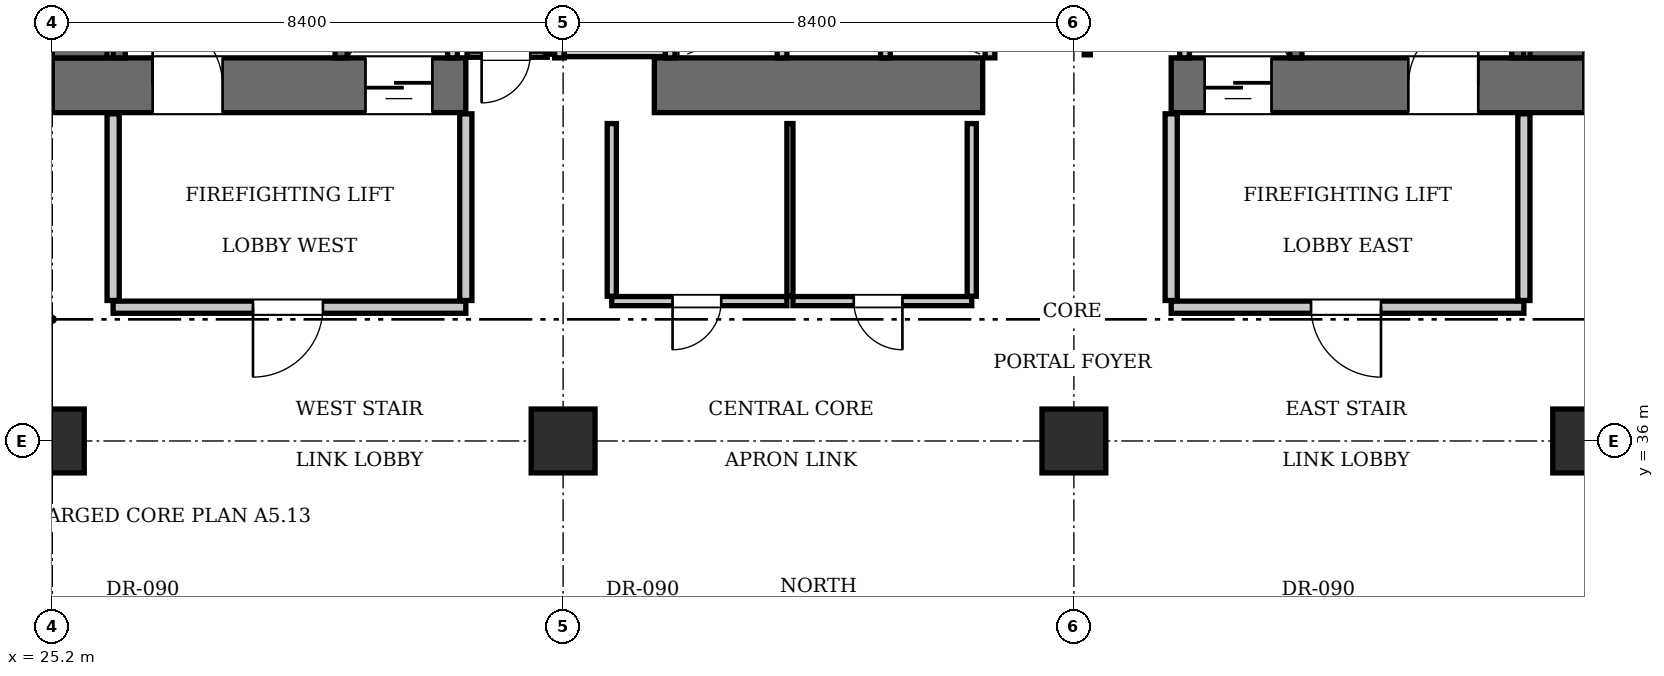
"""IFC4 building model, lengths in metres.
Left out: names, types, materials, properties, quantities, classifications, styles, units other than length and angle.
Written with IfcOpenShell. Run it as: python <this file> out.ifc"""

import sys

from ifc_helpers import new_model, si_unit, direction, frame, frame_2d, origin, origin_2d, place, context, subcontext, project, spatial, rectangle, extrude, element, fill, save


model = new_model("IFC4")
c1 = context("Model", 3, precision=1e-05, world=origin(), true_north=direction((0.0, 1.0)))
c2 = subcontext(c1, "Body", "Model", "MODEL_VIEW")
j1 = project(units=[si_unit("LENGTHUNIT", "METRE"), si_unit("PLANEANGLEUNIT", "RADIAN")], contexts=[c1])
p1 = place(None, origin())
s1 = spatial("IfcSite", under=j1, at=p1, CompositionType="ELEMENT")
p2 = place(p1, origin())
s2 = spatial("IfcBuilding", under=s1, at=p2, CompositionType="ELEMENT")
p3 = place(p2, frame((0.0, 0.0, 50.05)))
s3 = spatial("IfcBuildingStorey", under=s2, at=p3, CompositionType="ELEMENT", Elevation=50.05)
p4 = place(p3, frame((25.2, 41.85, 0.0), z_axis=(0.0, 0.0, 1.0), x_axis=(1.0, 0.0, 0.0)))
e1 = element("IfcWall", 1, at=p4, inside=s3, PredefinedType="SHEAR", context=c2, shape_type="SweptSolid", body=[
    extrude(rectangle(XDim=6.8, YDim=0.9, at=frame_2d((3.4, 0.0))), origin(), (0.0, 0.0, 1.0), 3.85),
])
p5 = place(p4, frame((1.65, 0.0, 0.0)))
e2 = element("IfcOpeningElement", 2, at=p5, cuts=e1, PredefinedType="OPENING", context=c2, shape_type="SweptSolid", body=[
    extrude(rectangle(XDim=1.15, YDim=2.15, at=frame_2d((0.575, 1.075))), frame((0.0, 0.46, 0.0), z_axis=(0.0, -1.0, 0.0), x_axis=(1.0, 0.0, 0.0)), (0.0, 0.0, 1.0), 0.92),
])
p6 = place(p4, frame((5.15, 0.0, 0.0)))
e3 = element("IfcOpeningElement", 3, at=p6, cuts=e1, PredefinedType="OPENING", context=c2, shape_type="SweptSolid", body=[
    extrude(rectangle(XDim=1.1, YDim=2.2, at=frame_2d((0.55, 1.1))), frame((0.0, 0.46, 0.0), z_axis=(0.0, -1.0, 0.0), x_axis=(1.0, 0.0, 0.0)), (0.0, 0.0, 1.0), 0.92),
])
p7 = place(p3, frame((35.1, 41.85, 0.0), z_axis=(0.0, 0.0, 1.0), x_axis=(1.0, 0.0, 0.0)))
e4 = element("IfcWall", 4, at=p7, inside=s3, PredefinedType="SHEAR", context=c2, shape_type="SweptSolid", body=[
    extrude(rectangle(XDim=5.4, YDim=0.9, at=frame_2d((2.7, 0.0))), origin(), (0.0, 0.0, 1.0), 3.85),
])
p8 = place(p3, frame((43.6, 41.85, 0.0), z_axis=(0.0, 0.0, 1.0), x_axis=(1.0, 0.0, 0.0)))
e5 = element("IfcWall", 5, at=p8, inside=s3, PredefinedType="SHEAR", context=c2, shape_type="SweptSolid", body=[
    extrude(rectangle(XDim=6.8, YDim=0.9, at=frame_2d((3.4, 0.0))), origin(), (0.0, 0.0, 1.0), 3.85),
])
p9 = place(p8, frame((3.9, 0.0, 0.0)))
e6 = element("IfcOpeningElement", 6, at=p9, cuts=e5, PredefinedType="OPENING", context=c2, shape_type="SweptSolid", body=[
    extrude(rectangle(XDim=1.15, YDim=2.15, at=frame_2d((0.575, 1.075))), frame((0.0, 0.46, 0.0), z_axis=(0.0, -1.0, 0.0), x_axis=(1.0, 0.0, 0.0)), (0.0, 0.0, 1.0), 0.92),
])
p10 = place(p8, frame((0.55, 0.0, 0.0)))
e7 = element("IfcOpeningElement", 7, at=p10, cuts=e5, PredefinedType="OPENING", context=c2, shape_type="SweptSolid", body=[
    extrude(rectangle(XDim=1.1, YDim=2.2, at=frame_2d((0.55, 1.1))), frame((0.0, 0.46, 0.0), z_axis=(0.0, -1.0, 0.0), x_axis=(1.0, 0.0, 0.0)), (0.0, 0.0, 1.0), 0.92),
])
for number, where, z_axis, x_axis in (
    (8, (25.65, 42.3, 0.0), (0.0, 0.0, 1.0), (0.0, 1.0, 0.0)),
    (9, (49.95, 42.3, 0.0), (0.0, 0.0, 1.0), (0.0, 1.0, 0.0)),
):
    element("IfcWall", number, at=place(p3, frame(where, z_axis=z_axis, x_axis=x_axis)), inside=s3, PredefinedType="SHEAR", context=c2, shape_type="SweptSolid", body=[
        extrude(rectangle(XDim=1.6, YDim=0.9, at=frame_2d((0.8, 0.0))), origin(), (0.0, 0.0, 1.0), 3.85),
    ])
for number, where, z_axis, x_axis in (
    (10, (25.2, 36.0, 0.0), (0.0, 0.0, 1.0), (1.0, 0.0, 0.0)),
    (11, (33.6, 36.0, 0.0), (0.0, 0.0, 1.0), (1.0, 0.0, 0.0)),
    (12, (42.0, 36.0, 0.0), (0.0, 0.0, 1.0), (1.0, 0.0, 0.0)),
    (13, (50.4, 36.0, 0.0), (0.0, 0.0, 1.0), (1.0, 0.0, 0.0)),
):
    element("IfcColumn", number, at=place(p3, frame(where, z_axis=z_axis, x_axis=x_axis)), inside=s3, PredefinedType="COLUMN", context=c2, shape_type="SweptSolid", body=[
        extrude(rectangle(XDim=1.05, YDim=1.05, at=origin_2d()), origin(), (0.0, 0.0, 1.0), 3.85),
    ])
p11 = place(p3, frame((29.95, 42.3, 0.0), z_axis=(0.0, 0.0, 1.0), x_axis=(0.0, 1.0, 0.0)))
e14 = element("IfcWall", 14, at=p11, inside=s3, PredefinedType="SOLIDWALL", context=c2, shape_type="SweptSolid", body=[
    extrude(rectangle(XDim=8.85, YDim=0.2, at=frame_2d((4.425, 0.0))), origin(), (0.0, 0.0, 1.0), 3.61),
])
p12 = place(p3, frame((26.3, 42.3, 0.0), z_axis=(0.0, 0.0, 1.0), x_axis=(0.0, 1.0, 0.0)))
e15 = element("IfcWall", 15, at=p12, inside=s3, PredefinedType="SOLIDWALL", context=c2, shape_type="SweptSolid", body=[
    extrude(rectangle(XDim=1.58, YDim=0.2, at=frame_2d((0.79, 0.0))), origin(), (0.0, 0.0, 1.0), 3.61),
])
p13 = place(p3, frame((45.65, 42.3, 0.0), z_axis=(0.0, 0.0, 1.0), x_axis=(0.0, 1.0, 0.0)))
e16 = element("IfcWall", 16, at=p13, inside=s3, PredefinedType="SOLIDWALL", context=c2, shape_type="SweptSolid", body=[
    extrude(rectangle(XDim=8.85, YDim=0.2, at=frame_2d((4.425, 0.0))), origin(), (0.0, 0.0, 1.0), 3.61),
])
p14 = place(p3, frame((49.3, 42.3, 0.0), z_axis=(0.0, 0.0, 1.0), x_axis=(0.0, 1.0, 0.0)))
e17 = element("IfcWall", 17, at=p14, inside=s3, PredefinedType="SOLIDWALL", context=c2, shape_type="SweptSolid", body=[
    extrude(rectangle(XDim=1.58, YDim=0.2, at=frame_2d((0.79, 0.0))), origin(), (0.0, 0.0, 1.0), 3.61),
])
for number, where, z_axis, x_axis in (
    (18, (31.78, 42.3, 0.0), (0.0, 0.0, 1.0), (0.0, 1.0, 0.0)),
    (19, (43.82, 42.3, 0.0), (0.0, 0.0, 1.0), (0.0, 1.0, 0.0)),
):
    element("IfcWall", number, at=place(p3, frame(where, z_axis=z_axis, x_axis=x_axis)), inside=s3, PredefinedType="SOLIDWALL", context=c2, shape_type="SweptSolid", body=[
        extrude(rectangle(XDim=2.44, YDim=0.16, at=frame_2d((1.22, 0.0))), origin(), (0.0, 0.0, 1.0), 3.61),
    ])
for number, where, z_axis, x_axis in (
    (20, (37.2, 42.3, 0.0), (0.0, 0.0, 1.0), (0.0, 1.0, 0.0)),
    (21, (38.9, 42.3, 0.0), (0.0, 0.0, 1.0), (0.0, 1.0, 0.0)),
    (22, (40.62, 42.3, 0.0), (0.0, 0.0, 1.0), (0.0, 1.0, 0.0)),
):
    element("IfcWall", number, at=place(p3, frame(where, z_axis=z_axis, x_axis=x_axis)), inside=s3, PredefinedType="SOLIDWALL", context=c2, shape_type="SweptSolid", body=[
        extrude(rectangle(XDim=2.05, YDim=0.16, at=frame_2d((1.025, 0.0))), origin(), (0.0, 0.0, 1.0), 3.61),
    ])
for number, where, z_axis, x_axis in (
    (23, (33.54, 42.3, 0.0), (0.0, 0.0, 1.0), (0.0, 1.0, 0.0)),
    (24, (35.36, 42.3, 0.0), (0.0, 0.0, 1.0), (0.0, 1.0, 0.0)),
):
    element("IfcWall", number, at=place(p3, frame(where, z_axis=z_axis, x_axis=x_axis)), inside=s3, PredefinedType="SOLIDWALL", context=c2, shape_type="SweptSolid", body=[
        extrude(rectangle(XDim=2.1, YDim=0.16, at=frame_2d((1.05, 0.0))), origin(), (0.0, 0.0, 1.0), 3.61),
    ])
p15 = place(p3, frame((33.62, 42.4, 0.0), z_axis=(0.0, 0.0, 1.0), x_axis=(1.0, 0.0, 0.0)))
e25 = element("IfcWall", 25, at=p15, inside=s3, PredefinedType="SOLIDWALL", context=c2, shape_type="SweptSolid", body=[
    extrude(rectangle(XDim=1.66, YDim=0.16, at=frame_2d((0.83, 0.0))), origin(), (0.0, 0.0, 1.0), 3.61),
])
p16 = place(p3, frame((26.2, 38.2, 0.0), z_axis=(0.0, 0.0, 1.0), x_axis=(1.0, 0.0, 0.0)))
e26 = element("IfcWall", 26, at=p16, inside=s3, PredefinedType="PARTITIONING", context=c2, shape_type="SweptSolid", body=[
    extrude(rectangle(XDim=5.8, YDim=0.2, at=frame_2d((2.9, 0.0))), origin(), (0.0, 0.0, 1.0), 3.61),
])
p17 = place(p16, frame((2.3, 0.0, 0.0)))
e27 = element("IfcOpeningElement", 27, at=p17, cuts=e26, PredefinedType="OPENING", context=c2, shape_type="SweptSolid", body=[
    extrude(rectangle(XDim=1.15, YDim=2.15, at=frame_2d((0.575, 1.075))), frame((0.0, 0.11, 0.0), z_axis=(0.0, -1.0, 0.0), x_axis=(1.0, 0.0, 0.0)), (0.0, 0.0, 1.0), 0.22),
])
for number, where, z_axis, x_axis in (
    (28, (26.2, 38.31, 0.0), (0.0, 0.0, 1.0), (0.0, 1.0, 0.0)),
    (29, (32.0, 38.31, 0.0), (0.0, 0.0, 1.0), (0.0, 1.0, 0.0)),
):
    element("IfcWall", number, at=place(p3, frame(where, z_axis=z_axis, x_axis=x_axis)), inside=s3, PredefinedType="PARTITIONING", context=c2, shape_type="SweptSolid", body=[
        extrude(rectangle(XDim=3.07, YDim=0.2, at=frame_2d((1.535, 0.0))), origin(), (0.0, 0.0, 1.0), 3.61),
    ])
p18 = place(p3, frame((43.6, 38.2, 0.0), z_axis=(0.0, 0.0, 1.0), x_axis=(1.0, 0.0, 0.0)))
e30 = element("IfcWall", 30, at=p18, inside=s3, PredefinedType="PARTITIONING", context=c2, shape_type="SweptSolid", body=[
    extrude(rectangle(XDim=5.8, YDim=0.2, at=frame_2d((2.9, 0.0))), origin(), (0.0, 0.0, 1.0), 3.61),
])
p19 = place(p18, frame((2.3, 0.0, 0.0)))
e31 = element("IfcOpeningElement", 31, at=p19, cuts=e30, PredefinedType="OPENING", context=c2, shape_type="SweptSolid", body=[
    extrude(rectangle(XDim=1.15, YDim=2.15, at=frame_2d((0.575, 1.075))), frame((0.0, 0.11, 0.0), z_axis=(0.0, -1.0, 0.0), x_axis=(1.0, 0.0, 0.0)), (0.0, 0.0, 1.0), 0.22),
])
for number, where, z_axis, x_axis in (
    (32, (43.6, 38.31, 0.0), (0.0, 0.0, 1.0), (0.0, 1.0, 0.0)),
    (33, (49.4, 38.31, 0.0), (0.0, 0.0, 1.0), (0.0, 1.0, 0.0)),
):
    element("IfcWall", number, at=place(p3, frame(where, z_axis=z_axis, x_axis=x_axis)), inside=s3, PredefinedType="PARTITIONING", context=c2, shape_type="SweptSolid", body=[
        extrude(rectangle(XDim=3.07, YDim=0.2, at=frame_2d((1.535, 0.0))), origin(), (0.0, 0.0, 1.0), 3.61),
    ])
p20 = place(p3, frame((32.02, 42.36, 0.0), z_axis=(0.0, 0.0, 1.0), x_axis=(1.0, 0.0, 0.0)))
e34 = element("IfcWall", 34, at=p20, inside=s3, PredefinedType="PARTITIONING", context=c2, shape_type="SweptSolid", body=[
    extrude(rectangle(XDim=1.32, YDim=0.1, at=frame_2d((0.66, 0.0))), origin(), (0.0, 0.0, 1.0), 3.61),
])
p21 = place(p20, frame((0.24, 0.0, 0.0)))
e35 = element("IfcOpeningElement", 35, at=p21, cuts=e34, PredefinedType="OPENING", context=c2, shape_type="SweptSolid", body=[
    extrude(rectangle(XDim=0.8, YDim=2.05, at=frame_2d((0.4, 1.025))), frame((0.0, 0.06, 0.0), z_axis=(0.0, -1.0, 0.0), x_axis=(1.0, 0.0, 0.0)), (0.0, 0.0, 1.0), 0.12),
])
p22 = place(p3, frame((33.36, 42.36, 0.0), z_axis=(0.0, 0.0, 1.0), x_axis=(0.0, 1.0, 0.0)))
e36 = element("IfcWall", 36, at=p22, inside=s3, PredefinedType="PARTITIONING", context=c2, shape_type="SweptSolid", body=[
    extrude(rectangle(XDim=2.58, YDim=0.1, at=frame_2d((1.29, 0.0))), origin(), (0.0, 0.0, 1.0), 3.61),
])
p23 = place(p3, frame((42.22, 42.35, 0.0), z_axis=(0.0, 0.0, 1.0), x_axis=(0.0, 1.0, 0.0)))
e37 = element("IfcWall", 37, at=p23, inside=s3, PredefinedType="PARTITIONING", context=c2, shape_type="SweptSolid", body=[
    extrude(rectangle(XDim=2.61, YDim=0.1, at=frame_2d((1.305, 0.0))), origin(), (0.0, 0.0, 1.0), 3.61),
])
p24 = place(p23, frame((0.65, 0.0, 0.0)))
e38 = element("IfcOpeningElement", 38, at=p24, cuts=e37, PredefinedType="OPENING", context=c2, shape_type="SweptSolid", body=[
    extrude(rectangle(XDim=0.8, YDim=2.05, at=frame_2d((0.4, 1.025))), frame((0.0, 0.06, 0.0), z_axis=(0.0, -1.0, 0.0), x_axis=(1.0, 0.0, 0.0)), (0.0, 0.0, 1.0), 0.12),
])
p25 = place(p3, frame((34.4, 38.3, 0.0), z_axis=(0.0, 0.0, 1.0), x_axis=(1.0, 0.0, 0.0)))
e39 = element("IfcWall", 39, at=p25, inside=s3, PredefinedType="PARTITIONING", context=c2, shape_type="SweptSolid", body=[
    extrude(rectangle(XDim=2.88, YDim=0.15, at=frame_2d((1.44, 0.0))), origin(), (0.0, 0.0, 1.0), 3.61),
])
p26 = place(p25, frame((1.0, 0.0, 0.0)))
e40 = element("IfcOpeningElement", 40, at=p26, cuts=e39, PredefinedType="OPENING", context=c2, shape_type="SweptSolid", body=[
    extrude(rectangle(XDim=0.8, YDim=2.05, at=frame_2d((0.4, 1.025))), frame((0.0, 0.085, 0.0), z_axis=(0.0, -1.0, 0.0), x_axis=(1.0, 0.0, 0.0)), (0.0, 0.0, 1.0), 0.17),
])
p27 = place(p3, frame((37.38, 38.3, 0.0), z_axis=(0.0, 0.0, 1.0), x_axis=(1.0, 0.0, 0.0)))
e41 = element("IfcWall", 41, at=p27, inside=s3, PredefinedType="PARTITIONING", context=c2, shape_type="SweptSolid", body=[
    extrude(rectangle(XDim=2.94, YDim=0.15, at=frame_2d((1.47, 0.0))), origin(), (0.0, 0.0, 1.0), 3.61),
])
p28 = place(p27, frame((1.0, 0.0, 0.0)))
e42 = element("IfcOpeningElement", 42, at=p28, cuts=e41, PredefinedType="OPENING", context=c2, shape_type="SweptSolid", body=[
    extrude(rectangle(XDim=0.8, YDim=2.05, at=frame_2d((0.4, 1.025))), frame((0.0, 0.085, 0.0), z_axis=(0.0, -1.0, 0.0), x_axis=(1.0, 0.0, 0.0)), (0.0, 0.0, 1.0), 0.17),
])
p29 = place(p3, frame((34.4, 38.38, 0.0), z_axis=(0.0, 0.0, 1.0), x_axis=(0.0, 1.0, 0.0)))
e43 = element("IfcWall", 43, at=p29, inside=s3, PredefinedType="PARTITIONING", context=c2, shape_type="SweptSolid", body=[
    extrude(rectangle(XDim=2.84, YDim=0.15, at=frame_2d((1.42, 0.0))), origin(), (0.0, 0.0, 1.0), 3.61),
])
p30 = place(p3, frame((37.33, 38.38, 0.0), z_axis=(0.0, 0.0, 1.0), x_axis=(0.0, 1.0, 0.0)))
e44 = element("IfcWall", 44, at=p30, inside=s3, PredefinedType="PARTITIONING", context=c2, shape_type="SweptSolid", body=[
    extrude(rectangle(XDim=2.84, YDim=0.1, at=frame_2d((1.42, 0.0))), origin(), (0.0, 0.0, 1.0), 3.61),
])
p31 = place(p3, frame((40.32, 38.38, 0.0), z_axis=(0.0, 0.0, 1.0), x_axis=(0.0, 1.0, 0.0)))
e45 = element("IfcWall", 45, at=p31, inside=s3, PredefinedType="PARTITIONING", context=c2, shape_type="SweptSolid", body=[
    extrude(rectangle(XDim=2.84, YDim=0.15, at=frame_2d((1.42, 0.0))), origin(), (0.0, 0.0, 1.0), 3.61),
])
p32 = place(p5, origin())
e46 = element("IfcDoor", 46, at=p32, inside=s3, OperationType="SINGLE_SWING_LEFT", PredefinedType="DOOR", context=c2, shape_type="SweptSolid", body=[
    extrude(rectangle(XDim=1.15, YDim=2.15, at=frame_2d((0.575, 1.075))), frame((0.0, 0.025, 0.0), z_axis=(0.0, -1.0, 0.0), x_axis=(1.0, 0.0, 0.0)), (0.0, 0.0, 1.0), 0.05),
])
fill(e2, e46)
p33 = place(p9, origin())
e47 = element("IfcDoor", 47, at=p33, inside=s3, OperationType="SINGLE_SWING_RIGHT", PredefinedType="DOOR", context=c2, shape_type="SweptSolid", body=[
    extrude(rectangle(XDim=1.15, YDim=2.15, at=frame_2d((0.575, 1.075))), frame((0.0, 0.025, 0.0), z_axis=(0.0, -1.0, 0.0), x_axis=(1.0, 0.0, 0.0)), (0.0, 0.0, 1.0), 0.05),
])
fill(e6, e47)
p34 = place(p6, frame((1.1, 0.0, 0.0), z_axis=(0.0, 0.0, 1.0), x_axis=(-1.0, 0.0, 0.0)))
e48 = element("IfcDoor", 48, at=p34, inside=s3, OperationType="SLIDING_TO_LEFT", PredefinedType="DOOR", context=c2, shape_type="SweptSolid", body=[
    extrude(rectangle(XDim=1.1, YDim=2.2, at=frame_2d((0.55, 1.1))), frame((0.0, 0.025, 0.0), z_axis=(0.0, -1.0, 0.0), x_axis=(1.0, 0.0, 0.0)), (0.0, 0.0, 1.0), 0.05),
])
fill(e3, e48)
p35 = place(p10, frame((1.1, 0.0, 0.0), z_axis=(0.0, 0.0, 1.0), x_axis=(-1.0, 0.0, 0.0)))
e49 = element("IfcDoor", 49, at=p35, inside=s3, OperationType="SLIDING_TO_LEFT", PredefinedType="DOOR", context=c2, shape_type="SweptSolid", body=[
    extrude(rectangle(XDim=1.1, YDim=2.2, at=frame_2d((0.55, 1.1))), frame((0.0, 0.025, 0.0), z_axis=(0.0, -1.0, 0.0), x_axis=(1.0, 0.0, 0.0)), (0.0, 0.0, 1.0), 0.05),
])
fill(e7, e49)
p36 = place(p17, frame((1.15, 0.0, 0.0), z_axis=(0.0, 0.0, 1.0), x_axis=(-1.0, 0.0, 0.0)))
e50 = element("IfcDoor", 50, at=p36, inside=s3, OperationType="SINGLE_SWING_RIGHT", PredefinedType="DOOR", context=c2, shape_type="SweptSolid", body=[
    extrude(rectangle(XDim=1.15, YDim=2.15, at=frame_2d((0.575, 1.075))), frame((0.0, 0.025, 0.0), z_axis=(0.0, -1.0, 0.0), x_axis=(1.0, 0.0, 0.0)), (0.0, 0.0, 1.0), 0.05),
])
fill(e27, e50)
p37 = place(p19, frame((1.15, 0.0, 0.0), z_axis=(0.0, 0.0, 1.0), x_axis=(-1.0, 0.0, 0.0)))
e51 = element("IfcDoor", 51, at=p37, inside=s3, OperationType="SINGLE_SWING_LEFT", PredefinedType="DOOR", context=c2, shape_type="SweptSolid", body=[
    extrude(rectangle(XDim=1.15, YDim=2.15, at=frame_2d((0.575, 1.075))), frame((0.0, 0.025, 0.0), z_axis=(0.0, -1.0, 0.0), x_axis=(1.0, 0.0, 0.0)), (0.0, 0.0, 1.0), 0.05),
])
fill(e31, e51)
p38 = place(p21, frame((0.8, 0.0, 0.0), z_axis=(0.0, 0.0, 1.0), x_axis=(-1.0, 0.0, 0.0)))
e52 = element("IfcDoor", 52, at=p38, inside=s3, OperationType="SINGLE_SWING_RIGHT", PredefinedType="DOOR", context=c2, shape_type="SweptSolid", body=[
    extrude(rectangle(XDim=0.8, YDim=2.05, at=frame_2d((0.4, 1.025))), frame((0.0, 0.025, 0.0), z_axis=(0.0, -1.0, 0.0), x_axis=(1.0, 0.0, 0.0)), (0.0, 0.0, 1.0), 0.05),
])
fill(e35, e52)
p39 = place(p26, frame((0.8, 0.0, 0.0), z_axis=(0.0, 0.0, 1.0), x_axis=(-1.0, 0.0, 0.0)))
e53 = element("IfcDoor", 53, at=p39, inside=s3, OperationType="SINGLE_SWING_RIGHT", PredefinedType="DOOR", context=c2, shape_type="SweptSolid", body=[
    extrude(rectangle(XDim=0.8, YDim=2.05, at=frame_2d((0.4, 1.025))), frame((0.0, 0.025, 0.0), z_axis=(0.0, -1.0, 0.0), x_axis=(1.0, 0.0, 0.0)), (0.0, 0.0, 1.0), 0.05),
])
fill(e40, e53)
p40 = place(p28, frame((0.8, 0.0, 0.0), z_axis=(0.0, 0.0, 1.0), x_axis=(-1.0, 0.0, 0.0)))
e54 = element("IfcDoor", 54, at=p40, inside=s3, OperationType="SINGLE_SWING_LEFT", PredefinedType="DOOR", context=c2, shape_type="SweptSolid", body=[
    extrude(rectangle(XDim=0.8, YDim=2.05, at=frame_2d((0.4, 1.025))), frame((0.0, 0.025, 0.0), z_axis=(0.0, -1.0, 0.0), x_axis=(1.0, 0.0, 0.0)), (0.0, 0.0, 1.0), 0.05),
])
fill(e42, e54)
save(model, sys.argv[1])
